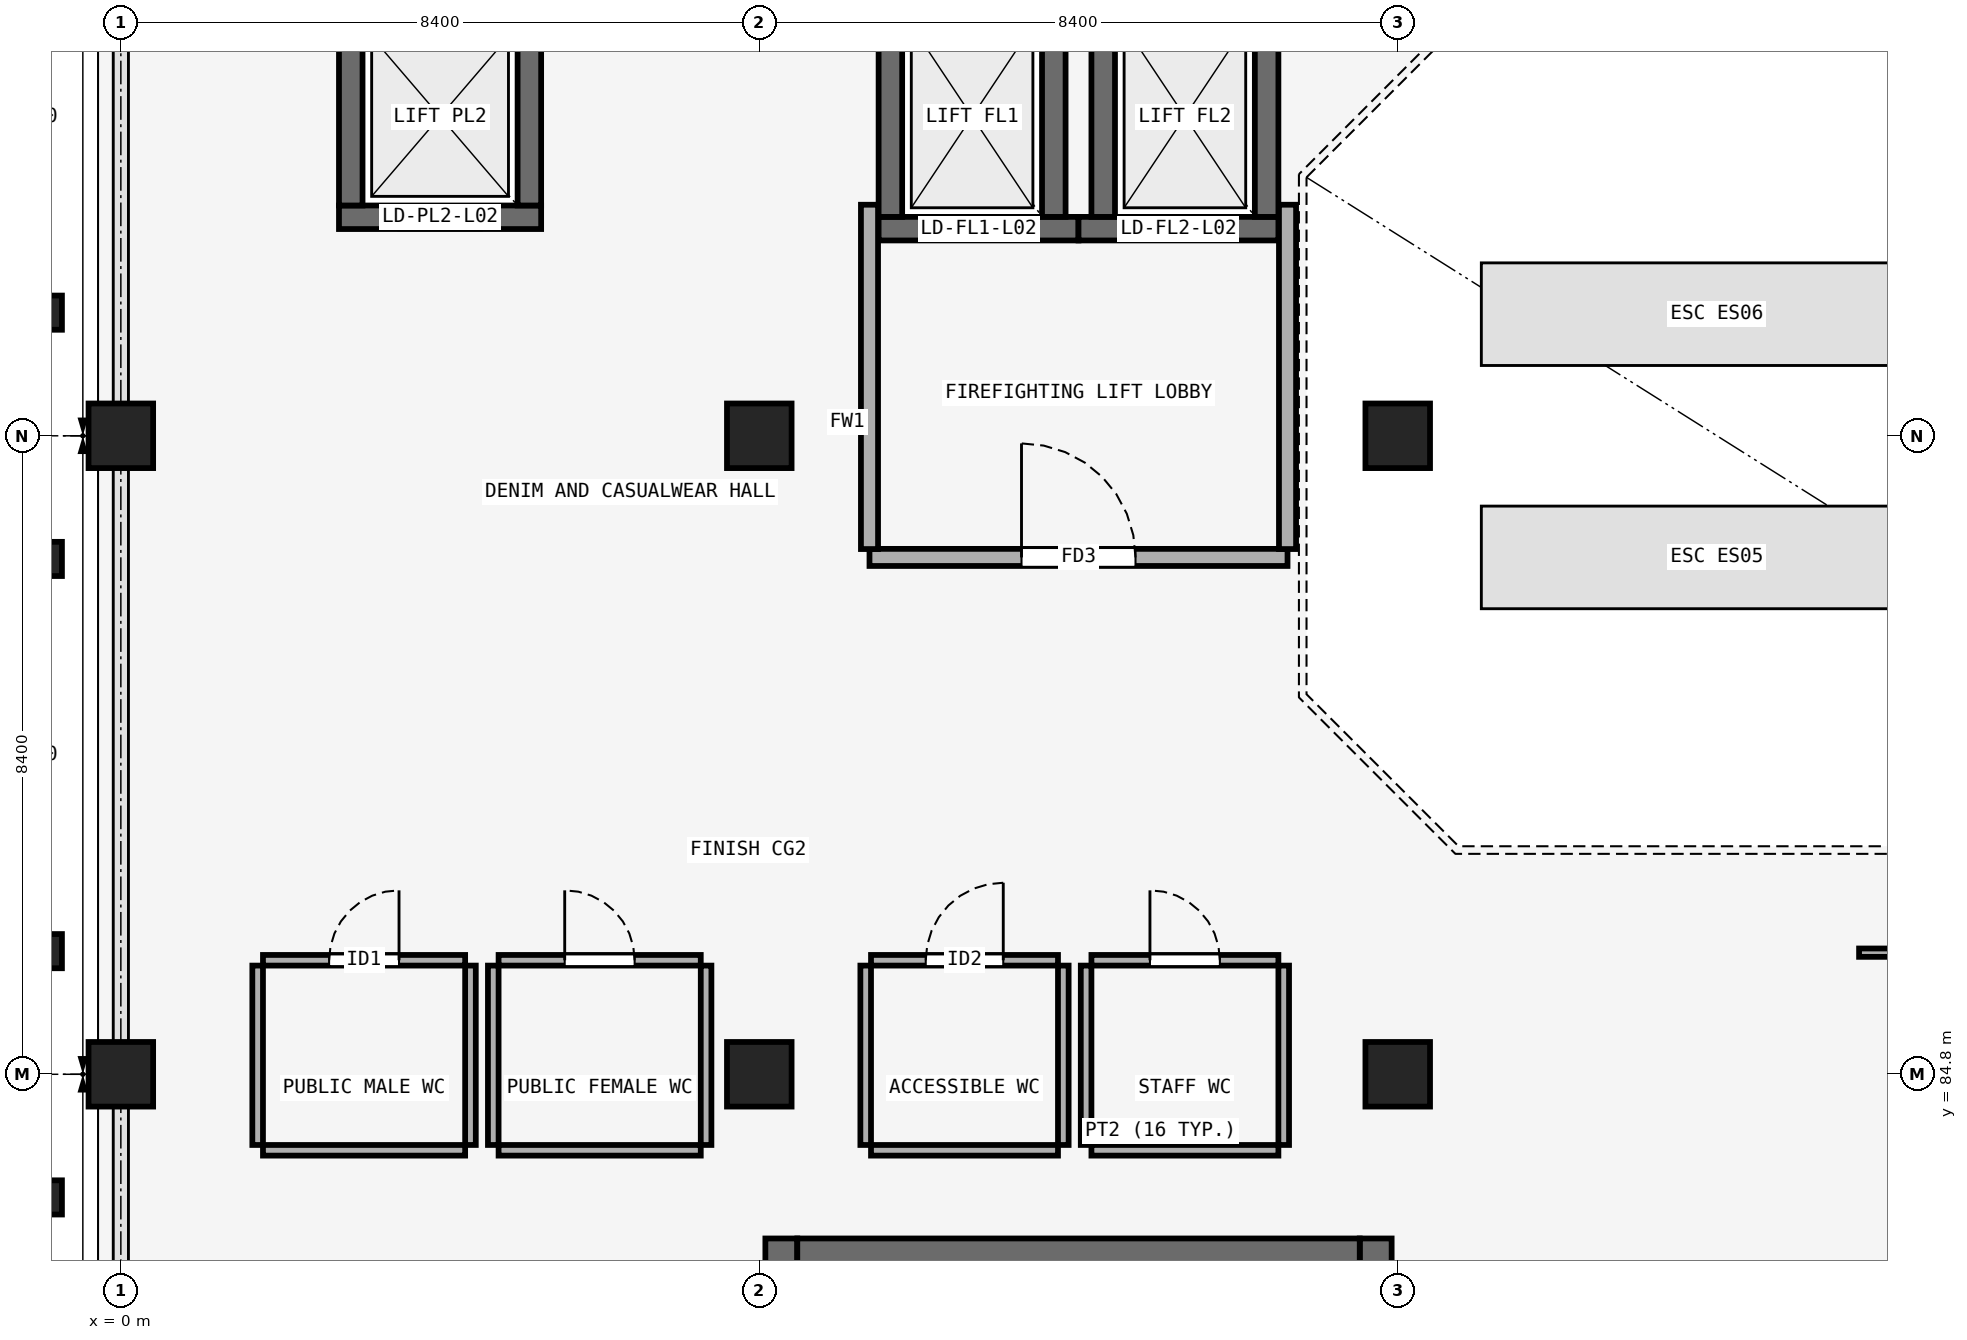
"""IFC4 building model, lengths in metres.
Left out: names, types, materials, properties, quantities, classifications, styles, units other than length and angle.
Written with IfcOpenShell. Run it as: python <this file> out.ifc"""

import sys

from ifc_helpers import new_model, si_unit, direction, frame, frame_2d, origin, origin_2d, place, context, subcontext, project, spatial, rectangle, extrude, element, fill, save


model = new_model("IFC4")
c1 = context("Model", 3, precision=1e-05, world=origin(), true_north=direction((0.0, 1.0)))
c2 = subcontext(c1, "Body", "Model", "MODEL_VIEW")
j1 = project(units=[si_unit("LENGTHUNIT", "METRE"), si_unit("PLANEANGLEUNIT", "RADIAN")], contexts=[c1])
p1 = place(None, origin())
s1 = spatial("IfcSite", under=j1, at=p1, CompositionType="ELEMENT")
p2 = place(p1, origin())
s2 = spatial("IfcBuilding", under=s1, at=p2, CompositionType="ELEMENT")
p3 = place(p2, frame((0.0, 0.0, 9.9)))
s3 = spatial("IfcBuildingStorey", under=s2, at=p3, CompositionType="ELEMENT", Elevation=9.9)
for number, where, z_axis, x_axis in (
    (1, (0.0, 84.8, 0.0), (0.0, 0.0, 1.0), (1.0, 0.0, 0.0)),
    (2, (8.4, 84.8, 0.0), (0.0, 0.0, 1.0), (1.0, 0.0, 0.0)),
    (3, (16.8, 84.8, 0.0), (0.0, 0.0, 1.0), (1.0, 0.0, 0.0)),
    (4, (0.0, 93.2, 0.0), (0.0, 0.0, 1.0), (1.0, 0.0, 0.0)),
    (5, (8.4, 93.2, 0.0), (0.0, 0.0, 1.0), (1.0, 0.0, 0.0)),
    (6, (16.8, 93.2, 0.0), (0.0, 0.0, 1.0), (1.0, 0.0, 0.0)),
):
    element("IfcColumn", number, at=place(p3, frame(where, z_axis=z_axis, x_axis=x_axis)), inside=s3, PredefinedType="COLUMN", context=c2, shape_type="SweptSolid", body=[
        extrude(rectangle(XDim=0.85, YDim=0.85, at=origin_2d()), origin(), (0.0, 0.0, 1.0), 4.5),
    ])
for number, where, z_axis, x_axis in (
    (7, (-1.05, 83.18, 0.0), (0.0, 0.0, 1.0), (0.0, 1.0, 0.0)),
    (8, (-1.05, 86.42, 0.0), (0.0, 0.0, 1.0), (0.0, 1.0, 0.0)),
    (9, (-1.05, 91.58, 0.0), (0.0, 0.0, 1.0), (0.0, 1.0, 0.0)),
    (10, (-1.05, 94.82, 0.0), (0.0, 0.0, 1.0), (0.0, 1.0, 0.0)),
):
    element("IfcColumn", number, at=place(p3, frame(where, z_axis=z_axis, x_axis=x_axis)), inside=s3, PredefinedType="PILASTER", context=c2, shape_type="SweptSolid", body=[
        extrude(rectangle(XDim=0.45, YDim=0.55, at=origin_2d()), origin(), (0.0, 0.0, 1.0), 4.5),
    ])
p4 = place(p3, frame((8.69, 82.64, 0.0), z_axis=(0.0, 0.0, 1.0), x_axis=(0.0, -1.0, 0.0)))
e11 = element("IfcWall", 11, at=p4, inside=s3, PredefinedType="SHEAR", context=c2, shape_type="SweptSolid", body=[
    extrude(rectangle(XDim=4.08, YDim=0.42, at=frame_2d((2.04, 0.0))), origin(), (0.0, 0.0, 1.0), 4.2),
])
p5 = place(p4, frame((1.315, 0.0, 0.0)))
e12 = element("IfcOpeningElement", 12, at=p5, cuts=e11, PredefinedType="OPENING", context=c2, shape_type="SweptSolid", body=[
    extrude(rectangle(XDim=1.45, YDim=2.2, at=frame_2d((0.725, 1.1))), frame((0.0, 0.22, 0.0), z_axis=(0.0, -1.0, 0.0), x_axis=(1.0, 0.0, 0.0)), (0.0, 0.0, 1.0), 0.44),
])
p6 = place(p3, frame((16.51, 78.56, 0.0), z_axis=(0.0, 0.0, 1.0), x_axis=(0.0, 1.0, 0.0)))
e13 = element("IfcWall", 13, at=p6, inside=s3, PredefinedType="SHEAR", context=c2, shape_type="SweptSolid", body=[
    extrude(rectangle(XDim=4.08, YDim=0.42, at=frame_2d((2.04, 0.0))), origin(), (0.0, 0.0, 1.0), 4.2),
])
p7 = place(p3, frame((8.9, 82.43, 0.0), z_axis=(0.0, 0.0, 1.0), x_axis=(1.0, 0.0, 0.0)))
e14 = element("IfcWall", 14, at=p7, inside=s3, PredefinedType="SHEAR", context=c2, shape_type="SweptSolid", body=[
    extrude(rectangle(XDim=7.4, YDim=0.42, at=frame_2d((3.7, 0.0))), origin(), (0.0, 0.0, 1.0), 4.2),
])
p8 = place(p3, frame((9.97, 95.925, 0.0), z_axis=(0.0, 0.0, 1.0), x_axis=(1.0, 0.0, 0.0)))
e15 = element("IfcWall", 15, at=p8, inside=s3, PredefinedType="SHEAR", context=c2, shape_type="SweptSolid", body=[
    extrude(rectangle(XDim=2.63, YDim=0.31, at=frame_2d((1.315, 0.0))), origin(), (0.0, 0.0, 1.0), 4.2),
])
p9 = place(p8, frame((0.715, 0.0, 0.0)))
e16 = element("IfcOpeningElement", 16, at=p9, cuts=e15, PredefinedType="OPENING", context=c2, shape_type="SweptSolid", body=[
    extrude(rectangle(XDim=1.2, YDim=2.25, at=frame_2d((0.6, 1.125))), frame((0.0, 0.165, 0.0), z_axis=(0.0, -1.0, 0.0), x_axis=(1.0, 0.0, 0.0)), (0.0, 0.0, 1.0), 0.33),
])
for number, where, z_axis, x_axis in (
    (17, (10.125, 96.08, 0.0), (0.0, 0.0, 1.0), (0.0, 1.0, 0.0)),
    (18, (12.275, 96.08, 0.0), (0.0, 0.0, 1.0), (0.0, 1.0, 0.0)),
):
    element("IfcWall", number, at=place(p3, frame(where, z_axis=z_axis, x_axis=x_axis)), inside=s3, PredefinedType="SHEAR", context=c2, shape_type="SweptSolid", body=[
        extrude(rectangle(XDim=2.64, YDim=0.31, at=frame_2d((1.32, 0.0))), origin(), (0.0, 0.0, 1.0), 4.2),
    ])
p10 = place(p3, frame((12.6, 95.925, 0.0), z_axis=(0.0, 0.0, 1.0), x_axis=(1.0, 0.0, 0.0)))
e19 = element("IfcWall", 19, at=p10, inside=s3, PredefinedType="SHEAR", context=c2, shape_type="SweptSolid", body=[
    extrude(rectangle(XDim=2.63, YDim=0.31, at=frame_2d((1.315, 0.0))), origin(), (0.0, 0.0, 1.0), 4.2),
])
p11 = place(p10, frame((0.715, 0.0, 0.0)))
e20 = element("IfcOpeningElement", 20, at=p11, cuts=e19, PredefinedType="OPENING", context=c2, shape_type="SweptSolid", body=[
    extrude(rectangle(XDim=1.2, YDim=2.25, at=frame_2d((0.6, 1.125))), frame((0.0, 0.165, 0.0), z_axis=(0.0, -1.0, 0.0), x_axis=(1.0, 0.0, 0.0)), (0.0, 0.0, 1.0), 0.33),
])
for number, where, z_axis, x_axis in (
    (21, (12.925, 96.08, 0.0), (0.0, 0.0, 1.0), (0.0, 1.0, 0.0)),
    (22, (15.075, 96.08, 0.0), (0.0, 0.0, 1.0), (0.0, 1.0, 0.0)),
):
    element("IfcWall", number, at=place(p3, frame(where, z_axis=z_axis, x_axis=x_axis)), inside=s3, PredefinedType="SHEAR", context=c2, shape_type="SweptSolid", body=[
        extrude(rectangle(XDim=2.64, YDim=0.31, at=frame_2d((1.32, 0.0))), origin(), (0.0, 0.0, 1.0), 4.2),
    ])
p12 = place(p3, frame((2.87, 96.075, 0.0), z_axis=(0.0, 0.0, 1.0), x_axis=(1.0, 0.0, 0.0)))
e23 = element("IfcWall", 23, at=p12, inside=s3, PredefinedType="SHEAR", context=c2, shape_type="SweptSolid", body=[
    extrude(rectangle(XDim=2.66, YDim=0.31, at=frame_2d((1.33, 0.0))), origin(), (0.0, 0.0, 1.0), 4.2),
])
p13 = place(p12, frame((0.78, 0.0, 0.0)))
e24 = element("IfcOpeningElement", 24, at=p13, cuts=e23, PredefinedType="OPENING", context=c2, shape_type="SweptSolid", body=[
    extrude(rectangle(XDim=1.1, YDim=2.2, at=frame_2d((0.55, 1.1))), frame((0.0, 0.165, 0.0), z_axis=(0.0, -1.0, 0.0), x_axis=(1.0, 0.0, 0.0)), (0.0, 0.0, 1.0), 0.33),
])
for number, where, z_axis, x_axis in (
    (25, (3.025, 96.23, 0.0), (0.0, 0.0, 1.0), (0.0, 1.0, 0.0)),
    (26, (5.375, 96.23, 0.0), (0.0, 0.0, 1.0), (0.0, 1.0, 0.0)),
):
    element("IfcWall", number, at=place(p3, frame(where, z_axis=z_axis, x_axis=x_axis)), inside=s3, PredefinedType="SHEAR", context=c2, shape_type="SweptSolid", body=[
        extrude(rectangle(XDim=2.34, YDim=0.31, at=frame_2d((1.17, 0.0))), origin(), (0.0, 0.0, 1.0), 4.2),
    ])
p14 = place(p3, frame((9.85, 91.6, 0.0), z_axis=(0.0, 0.0, 1.0), x_axis=(1.0, 0.0, 0.0)))
e27 = element("IfcWall", 27, at=p14, inside=s3, PredefinedType="PARTITIONING", context=c2, shape_type="SweptSolid", body=[
    extrude(rectangle(XDim=5.5, YDim=0.225, at=frame_2d((2.75, 0.0))), origin(), (0.0, 0.0, 1.0), 4.2),
])
p15 = place(p14, frame((2.0, 0.0, 0.0)))
e28 = element("IfcOpeningElement", 28, at=p15, cuts=e27, PredefinedType="OPENING", context=c2, shape_type="SweptSolid", body=[
    extrude(rectangle(XDim=1.5, YDim=2.25, at=frame_2d((0.75, 1.125))), frame((0.0, 0.123, 0.0), z_axis=(0.0, -1.0, 0.0), x_axis=(1.0, 0.0, 0.0)), (0.0, 0.0, 1.0), 0.245),
])
for number, where, z_axis, x_axis in (
    (29, (9.85, 91.71, 0.0), (0.0, 0.0, 1.0), (0.0, 1.0, 0.0)),
    (30, (15.35, 91.71, 0.0), (0.0, 0.0, 1.0), (0.0, 1.0, 0.0)),
):
    element("IfcWall", number, at=place(p3, frame(where, z_axis=z_axis, x_axis=x_axis)), inside=s3, PredefinedType="PARTITIONING", context=c2, shape_type="SweptSolid", body=[
        extrude(rectangle(XDim=4.53, YDim=0.225, at=frame_2d((2.265, 0.0))), origin(), (0.0, 0.0, 1.0), 3.5),
    ])
p16 = place(p3, frame((1.87, 86.3, 0.0), z_axis=(0.0, 0.0, 1.0), x_axis=(1.0, 0.0, 0.0)))
e31 = element("IfcWall", 31, at=p16, inside=s3, PredefinedType="PARTITIONING", context=c2, shape_type="SweptSolid", body=[
    extrude(rectangle(XDim=2.66, YDim=0.14, at=frame_2d((1.33, 0.0))), origin(), (0.0, 0.0, 1.0), 4.2),
])
p17 = place(p16, frame((0.87, 0.0, 0.0)))
e32 = element("IfcOpeningElement", 32, at=p17, cuts=e31, PredefinedType="OPENING", context=c2, shape_type="SweptSolid", body=[
    extrude(rectangle(XDim=0.92, YDim=2.12, at=frame_2d((0.46, 1.06))), frame((0.0, 0.08, 0.0), z_axis=(0.0, -1.0, 0.0), x_axis=(1.0, 0.0, 0.0)), (0.0, 0.0, 1.0), 0.16),
])
p18 = place(p3, frame((1.87, 83.8, 0.0), z_axis=(0.0, 0.0, 1.0), x_axis=(1.0, 0.0, 0.0)))
e33 = element("IfcWall", 33, at=p18, inside=s3, PredefinedType="PARTITIONING", context=c2, shape_type="SweptSolid", body=[
    extrude(rectangle(XDim=2.66, YDim=0.14, at=frame_2d((1.33, 0.0))), origin(), (0.0, 0.0, 1.0), 4.2),
])
for number, where, z_axis, x_axis in (
    (34, (1.8, 83.87, 0.0), (0.0, 0.0, 1.0), (0.0, 1.0, 0.0)),
    (35, (4.6, 83.87, 0.0), (0.0, 0.0, 1.0), (0.0, 1.0, 0.0)),
):
    element("IfcWall", number, at=place(p3, frame(where, z_axis=z_axis, x_axis=x_axis)), inside=s3, PredefinedType="PARTITIONING", context=c2, shape_type="SweptSolid", body=[
        extrude(rectangle(XDim=2.36, YDim=0.14, at=frame_2d((1.18, 0.0))), origin(), (0.0, 0.0, 1.0), 3.45),
    ])
p19 = place(p3, frame((4.97, 86.3, 0.0), z_axis=(0.0, 0.0, 1.0), x_axis=(1.0, 0.0, 0.0)))
e36 = element("IfcWall", 36, at=p19, inside=s3, PredefinedType="PARTITIONING", context=c2, shape_type="SweptSolid", body=[
    extrude(rectangle(XDim=2.66, YDim=0.14, at=frame_2d((1.33, 0.0))), origin(), (0.0, 0.0, 1.0), 4.2),
])
p20 = place(p19, frame((0.87, 0.0, 0.0)))
e37 = element("IfcOpeningElement", 37, at=p20, cuts=e36, PredefinedType="OPENING", context=c2, shape_type="SweptSolid", body=[
    extrude(rectangle(XDim=0.92, YDim=2.12, at=frame_2d((0.46, 1.06))), frame((0.0, 0.08, 0.0), z_axis=(0.0, -1.0, 0.0), x_axis=(1.0, 0.0, 0.0)), (0.0, 0.0, 1.0), 0.16),
])
p21 = place(p3, frame((4.97, 83.8, 0.0), z_axis=(0.0, 0.0, 1.0), x_axis=(1.0, 0.0, 0.0)))
e38 = element("IfcWall", 38, at=p21, inside=s3, PredefinedType="PARTITIONING", context=c2, shape_type="SweptSolid", body=[
    extrude(rectangle(XDim=2.66, YDim=0.14, at=frame_2d((1.33, 0.0))), origin(), (0.0, 0.0, 1.0), 4.2),
])
for number, where, z_axis, x_axis in (
    (39, (4.9, 83.87, 0.0), (0.0, 0.0, 1.0), (0.0, 1.0, 0.0)),
    (40, (7.7, 83.87, 0.0), (0.0, 0.0, 1.0), (0.0, 1.0, 0.0)),
):
    element("IfcWall", number, at=place(p3, frame(where, z_axis=z_axis, x_axis=x_axis)), inside=s3, PredefinedType="PARTITIONING", context=c2, shape_type="SweptSolid", body=[
        extrude(rectangle(XDim=2.36, YDim=0.14, at=frame_2d((1.18, 0.0))), origin(), (0.0, 0.0, 1.0), 3.45),
    ])
p22 = place(p3, frame((9.87, 86.3, 0.0), z_axis=(0.0, 0.0, 1.0), x_axis=(1.0, 0.0, 0.0)))
e41 = element("IfcWall", 41, at=p22, inside=s3, PredefinedType="PARTITIONING", context=c2, shape_type="SweptSolid", body=[
    extrude(rectangle(XDim=2.46, YDim=0.14, at=frame_2d((1.23, 0.0))), origin(), (0.0, 0.0, 1.0), 4.2),
])
p23 = place(p22, frame((0.72, 0.0, 0.0)))
e42 = element("IfcOpeningElement", 42, at=p23, cuts=e41, PredefinedType="OPENING", context=c2, shape_type="SweptSolid", body=[
    extrude(rectangle(XDim=1.02, YDim=2.15, at=frame_2d((0.51, 1.075))), frame((0.0, 0.08, 0.0), z_axis=(0.0, -1.0, 0.0), x_axis=(1.0, 0.0, 0.0)), (0.0, 0.0, 1.0), 0.16),
])
p24 = place(p3, frame((9.87, 83.8, 0.0), z_axis=(0.0, 0.0, 1.0), x_axis=(1.0, 0.0, 0.0)))
e43 = element("IfcWall", 43, at=p24, inside=s3, PredefinedType="PARTITIONING", context=c2, shape_type="SweptSolid", body=[
    extrude(rectangle(XDim=2.46, YDim=0.14, at=frame_2d((1.23, 0.0))), origin(), (0.0, 0.0, 1.0), 4.2),
])
for number, where, z_axis, x_axis in (
    (44, (9.8, 83.87, 0.0), (0.0, 0.0, 1.0), (0.0, 1.0, 0.0)),
    (45, (12.4, 83.87, 0.0), (0.0, 0.0, 1.0), (0.0, 1.0, 0.0)),
):
    element("IfcWall", number, at=place(p3, frame(where, z_axis=z_axis, x_axis=x_axis)), inside=s3, PredefinedType="PARTITIONING", context=c2, shape_type="SweptSolid", body=[
        extrude(rectangle(XDim=2.36, YDim=0.14, at=frame_2d((1.18, 0.0))), origin(), (0.0, 0.0, 1.0), 3.45),
    ])
p25 = place(p3, frame((12.77, 86.3, 0.0), z_axis=(0.0, 0.0, 1.0), x_axis=(1.0, 0.0, 0.0)))
e46 = element("IfcWall", 46, at=p25, inside=s3, PredefinedType="PARTITIONING", context=c2, shape_type="SweptSolid", body=[
    extrude(rectangle(XDim=2.46, YDim=0.14, at=frame_2d((1.23, 0.0))), origin(), (0.0, 0.0, 1.0), 4.2),
])
p26 = place(p25, frame((0.77, 0.0, 0.0)))
e47 = element("IfcOpeningElement", 47, at=p26, cuts=e46, PredefinedType="OPENING", context=c2, shape_type="SweptSolid", body=[
    extrude(rectangle(XDim=0.92, YDim=2.12, at=frame_2d((0.46, 1.06))), frame((0.0, 0.08, 0.0), z_axis=(0.0, -1.0, 0.0), x_axis=(1.0, 0.0, 0.0)), (0.0, 0.0, 1.0), 0.16),
])
p27 = place(p3, frame((12.77, 83.8, 0.0), z_axis=(0.0, 0.0, 1.0), x_axis=(1.0, 0.0, 0.0)))
e48 = element("IfcWall", 48, at=p27, inside=s3, PredefinedType="PARTITIONING", context=c2, shape_type="SweptSolid", body=[
    extrude(rectangle(XDim=2.46, YDim=0.14, at=frame_2d((1.23, 0.0))), origin(), (0.0, 0.0, 1.0), 4.2),
])
for number, where, z_axis, x_axis in (
    (49, (12.7, 83.87, 0.0), (0.0, 0.0, 1.0), (0.0, 1.0, 0.0)),
    (50, (15.3, 83.87, 0.0), (0.0, 0.0, 1.0), (0.0, 1.0, 0.0)),
):
    element("IfcWall", number, at=place(p3, frame(where, z_axis=z_axis, x_axis=x_axis)), inside=s3, PredefinedType="PARTITIONING", context=c2, shape_type="SweptSolid", body=[
        extrude(rectangle(XDim=2.36, YDim=0.14, at=frame_2d((1.18, 0.0))), origin(), (0.0, 0.0, 1.0), 3.45),
    ])
p28 = place(p3, frame((22.87, 86.4, 0.0), z_axis=(0.0, 0.0, 1.0), x_axis=(1.0, 0.0, 0.0)))
e51 = element("IfcWall", 51, at=p28, inside=s3, PredefinedType="PARTITIONING", context=c2, shape_type="SweptSolid", body=[
    extrude(rectangle(XDim=6.21, YDim=0.11, at=frame_2d((3.105, 0.0))), origin(), (0.0, 0.0, 1.0), 4.2),
])
p29 = place(p28, frame((3.545, 0.0, 0.0)))
e52 = element("IfcOpeningElement", 52, at=p29, cuts=e51, PredefinedType="OPENING", context=c2, shape_type="SweptSolid", body=[
    extrude(rectangle(XDim=1.52, YDim=2.46, at=frame_2d((0.76, 1.23))), frame((0.0, 0.065, 0.0), z_axis=(0.0, -1.0, 0.0), x_axis=(1.0, 0.0, 0.0)), (0.0, 0.0, 1.0), 0.13),
])
p30 = place(p9, origin())
e53 = element("IfcDoor", 53, at=p30, inside=s3, OperationType="SLIDING_TO_LEFT", PredefinedType="DOOR", context=c2, shape_type="SweptSolid", body=[
    extrude(rectangle(XDim=1.2, YDim=2.25, at=frame_2d((0.6, 1.125))), frame((0.0, 0.025, 0.0), z_axis=(0.0, -1.0, 0.0), x_axis=(1.0, 0.0, 0.0)), (0.0, 0.0, 1.0), 0.05),
])
fill(e16, e53)
p31 = place(p11, origin())
e54 = element("IfcDoor", 54, at=p31, inside=s3, OperationType="SLIDING_TO_LEFT", PredefinedType="DOOR", context=c2, shape_type="SweptSolid", body=[
    extrude(rectangle(XDim=1.2, YDim=2.25, at=frame_2d((0.6, 1.125))), frame((0.0, 0.025, 0.0), z_axis=(0.0, -1.0, 0.0), x_axis=(1.0, 0.0, 0.0)), (0.0, 0.0, 1.0), 0.05),
])
fill(e20, e54)
p32 = place(p13, origin())
e55 = element("IfcDoor", 55, at=p32, inside=s3, OperationType="SLIDING_TO_LEFT", PredefinedType="DOOR", context=c2, shape_type="SweptSolid", body=[
    extrude(rectangle(XDim=1.1, YDim=2.2, at=frame_2d((0.55, 1.1))), frame((0.0, 0.025, 0.0), z_axis=(0.0, -1.0, 0.0), x_axis=(1.0, 0.0, 0.0)), (0.0, 0.0, 1.0), 0.05),
])
fill(e24, e55)
p33 = place(p15, origin())
e56 = element("IfcDoor", 56, at=p33, inside=s3, OperationType="SINGLE_SWING_LEFT", PredefinedType="DOOR", context=c2, shape_type="SweptSolid", body=[
    extrude(rectangle(XDim=1.5, YDim=2.25, at=frame_2d((0.75, 1.125))), frame((0.0, 0.025, 0.0), z_axis=(0.0, -1.0, 0.0), x_axis=(1.0, 0.0, 0.0)), (0.0, 0.0, 1.0), 0.05),
])
fill(e28, e56)
p34 = place(p17, origin())
e57 = element("IfcDoor", 57, at=p34, inside=s3, OperationType="SINGLE_SWING_RIGHT", PredefinedType="DOOR", context=c2, shape_type="SweptSolid", body=[
    extrude(rectangle(XDim=0.92, YDim=2.12, at=frame_2d((0.46, 1.06))), frame((0.0, 0.025, 0.0), z_axis=(0.0, -1.0, 0.0), x_axis=(1.0, 0.0, 0.0)), (0.0, 0.0, 1.0), 0.05),
])
fill(e32, e57)
p35 = place(p20, origin())
e58 = element("IfcDoor", 58, at=p35, inside=s3, OperationType="SINGLE_SWING_LEFT", PredefinedType="DOOR", context=c2, shape_type="SweptSolid", body=[
    extrude(rectangle(XDim=0.92, YDim=2.12, at=frame_2d((0.46, 1.06))), frame((0.0, 0.025, 0.0), z_axis=(0.0, -1.0, 0.0), x_axis=(1.0, 0.0, 0.0)), (0.0, 0.0, 1.0), 0.05),
])
fill(e37, e58)
p36 = place(p23, origin())
e59 = element("IfcDoor", 59, at=p36, inside=s3, OperationType="SINGLE_SWING_RIGHT", PredefinedType="DOOR", context=c2, shape_type="SweptSolid", body=[
    extrude(rectangle(XDim=1.02, YDim=2.15, at=frame_2d((0.51, 1.075))), frame((0.0, 0.025, 0.0), z_axis=(0.0, -1.0, 0.0), x_axis=(1.0, 0.0, 0.0)), (0.0, 0.0, 1.0), 0.05),
])
fill(e42, e59)
p37 = place(p26, origin())
e60 = element("IfcDoor", 60, at=p37, inside=s3, OperationType="SINGLE_SWING_LEFT", PredefinedType="DOOR", context=c2, shape_type="SweptSolid", body=[
    extrude(rectangle(XDim=0.92, YDim=2.12, at=frame_2d((0.46, 1.06))), frame((0.0, 0.025, 0.0), z_axis=(0.0, -1.0, 0.0), x_axis=(1.0, 0.0, 0.0)), (0.0, 0.0, 1.0), 0.05),
])
fill(e47, e60)
save(model, sys.argv[1])
